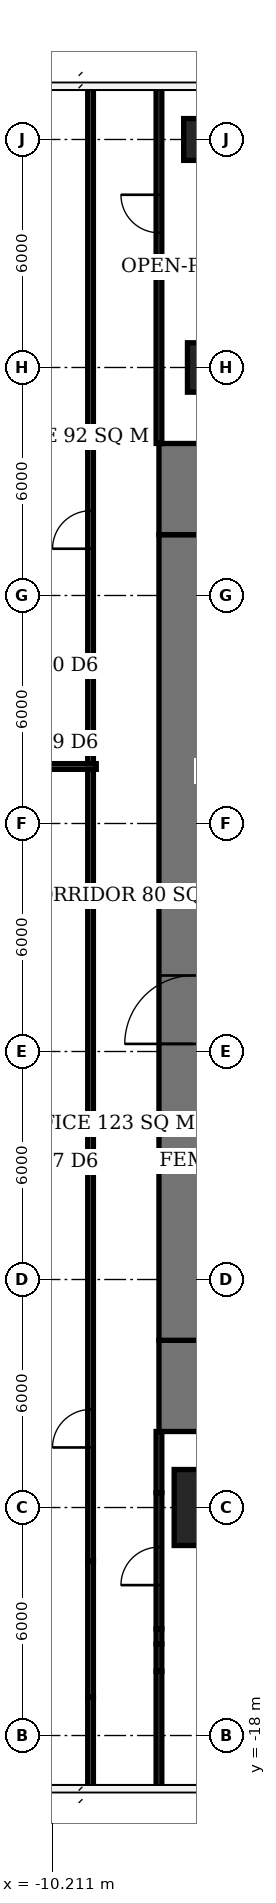
"""IFC4 building model, lengths in metres.
Left out: names, types, materials, properties, quantities, classifications, styles, units other than length and angle.
Written with IfcOpenShell. Run it as: python <this file> out.ifc"""

import sys

from ifc_helpers import new_model, si_unit, direction, frame, frame_2d, origin, origin_2d, place, context, subcontext, project, spatial, rectangle, extrude, element, fill, save


model = new_model("IFC4")
c1 = context("Model", 3, precision=1e-05, world=origin(), true_north=direction((0.0, 1.0)))
c2 = subcontext(c1, "Body", "Model", "MODEL_VIEW")
j1 = project(units=[si_unit("LENGTHUNIT", "METRE"), si_unit("PLANEANGLEUNIT", "RADIAN")], contexts=[c1])
p1 = place(None, origin())
s1 = spatial("IfcSite", under=j1, at=p1, CompositionType="ELEMENT")
p2 = place(p1, origin())
s2 = spatial("IfcBuilding", under=s1, at=p2, CompositionType="ELEMENT")
p3 = place(p2, frame((0.0, 0.0, 220.1)))
s3 = spatial("IfcBuildingStorey", under=s2, at=p3, CompositionType="ELEMENT", Elevation=220.1)
p4 = place(p3, frame((-6.0, -12.0, 0.0), z_axis=(0.0, 0.0, 1.0), x_axis=(1.0, 0.0, 0.0)))
e1 = element("IfcColumn", 1, at=p4, inside=s3, PredefinedType="COLUMN", context=c2, shape_type="SweptSolid", body=[
    extrude(rectangle(XDim=2.0, YDim=2.0, at=origin_2d()), origin(), (0.0, 0.0, 1.0), 3.9),
])
p5 = place(p3, frame((-6.0, 18.0, 0.0), z_axis=(0.0, 0.0, 1.0), x_axis=(1.0, 0.0, 0.0)))
e2 = element("IfcColumn", 2, at=p5, inside=s3, PredefinedType="COLUMN", context=c2, shape_type="SweptSolid", body=[
    extrude(rectangle(XDim=1.3, YDim=1.3, at=origin_2d()), origin(), (0.0, 0.0, 1.0), 3.9),
])
p6 = place(p3, frame((-6.0, 24.0, 0.0), z_axis=(0.0, 0.0, 1.0), x_axis=(1.0, 0.0, 0.0)))
e3 = element("IfcColumn", 3, at=p6, inside=s3, PredefinedType="COLUMN", context=c2, shape_type="SweptSolid", body=[
    extrude(rectangle(XDim=1.5, YDim=1.1, at=origin_2d()), origin(), (0.0, 0.0, 1.0), 3.9),
])
p7 = place(p3, frame((-6.5, -7.6, 0.0), z_axis=(0.0, 0.0, 1.0), x_axis=(0.0, 1.0, 0.0)))
e4 = element("IfcWall", 4, at=p7, inside=s3, PredefinedType="SHEAR", context=c2, shape_type="SweptSolid", body=[
    extrude(rectangle(XDim=21.2, YDim=1.8, at=frame_2d((10.6, 0.0))), origin(), (0.0, 0.0, 1.0), 3.9),
])
p8 = place(p7, frame((7.8, 0.0, 0.0)))
e5 = element("IfcOpeningElement", 5, at=p8, cuts=e4, PredefinedType="OPENING", context=c2, shape_type="SweptSolid", body=[
    extrude(rectangle(XDim=1.8, YDim=2.4, at=frame_2d((0.9, 1.2))), frame((0.0, 0.91, 0.0), z_axis=(0.0, -1.0, 0.0), x_axis=(1.0, 0.0, 0.0)), (0.0, 0.0, 1.0), 1.82),
])
for number, where, z_axis, x_axis in (
    (6, (-6.5, -10.0, 0.0), (0.0, 0.0, 1.0), (0.0, 1.0, 0.0)),
    (7, (-6.5, 13.6, 0.0), (0.0, 0.0, 1.0), (0.0, 1.0, 0.0)),
):
    element("IfcWall", number, at=place(p3, frame(where, z_axis=z_axis, x_axis=x_axis)), inside=s3, PredefinedType="SHEAR", context=c2, shape_type="SweptSolid", body=[
        extrude(rectangle(XDim=2.4, YDim=1.8, at=frame_2d((1.2, 0.0))), origin(), (0.0, 0.0, 1.0), 3.9),
    ])
p9 = place(p3, frame((-11.925, 7.5, 0.0), z_axis=(0.0, 0.0, 1.0), x_axis=(1.0, 0.0, 0.0)))
e8 = element("IfcWall", 8, at=p9, inside=s3, PredefinedType="PARTITIONING", context=c2, shape_type="SweptSolid", body=[
    extrude(rectangle(XDim=2.875, YDim=0.15, at=frame_2d((1.438, 0.0))), origin(), (0.0, 0.0, 1.0), 3.65),
])
p10 = place(p3, frame((-9.2, -19.4, 0.0), z_axis=(0.0, 0.0, 1.0), x_axis=(0.0, 1.0, 0.0)))
e9 = element("IfcWall", 9, at=p10, inside=s3, PredefinedType="PARTITIONING", context=c2, shape_type="SweptSolid", body=[
    extrude(rectangle(XDim=2.408, YDim=0.15, at=frame_2d((1.204, 0.0))), origin(), (0.0, 0.0, 1.0), 3.65),
])
p11 = place(p3, frame((-9.2, -16.992, 0.0), z_axis=(0.0, 0.0, 1.0), x_axis=(0.0, 1.0, 0.0)))
e10 = element("IfcWall", 10, at=p11, inside=s3, PredefinedType="PARTITIONING", context=c2, shape_type="SweptSolid", body=[
    extrude(rectangle(XDim=3.584, YDim=0.15, at=frame_2d((1.792, 0.0))), origin(), (0.0, 0.0, 1.0), 2.65),
])
p12 = place(p3, frame((-9.2, -13.408, 0.0), z_axis=(0.0, 0.0, 1.0), x_axis=(0.0, 1.0, 0.0)))
e11 = element("IfcWall", 11, at=p12, inside=s3, PredefinedType="PARTITIONING", context=c2, shape_type="SweptSolid", body=[
    extrude(rectangle(XDim=20.833, YDim=0.15, at=frame_2d((10.417, 0.0))), origin(), (0.0, 0.0, 1.0), 3.65),
])
p13 = place(p12, frame((2.988, 0.0, 0.0)))
e12 = element("IfcOpeningElement", 12, at=p13, cuts=e11, PredefinedType="OPENING", context=c2, shape_type="SweptSolid", body=[
    extrude(rectangle(XDim=1.0, YDim=2.1, at=frame_2d((0.5, 1.05))), frame((0.0, 0.085, 0.0), z_axis=(0.0, -1.0, 0.0), x_axis=(1.0, 0.0, 0.0)), (0.0, 0.0, 1.0), 0.17),
])
p14 = place(p3, frame((-9.2, 7.575, 0.0), z_axis=(0.0, 0.0, 1.0), x_axis=(0.0, 1.0, 0.0)))
e13 = element("IfcWall", 13, at=p14, inside=s3, PredefinedType="PARTITIONING", context=c2, shape_type="SweptSolid", body=[
    extrude(rectangle(XDim=17.825, YDim=0.15, at=frame_2d((8.913, 0.0))), origin(), (0.0, 0.0, 1.0), 3.65),
])
p15 = place(p14, frame((5.655, 0.0, 0.0)))
e14 = element("IfcOpeningElement", 14, at=p15, cuts=e13, PredefinedType="OPENING", context=c2, shape_type="SweptSolid", body=[
    extrude(rectangle(XDim=1.0, YDim=2.1, at=frame_2d((0.5, 1.05))), frame((0.0, 0.085, 0.0), z_axis=(0.0, -1.0, 0.0), x_axis=(1.0, 0.0, 0.0)), (0.0, 0.0, 1.0), 0.17),
])
p16 = place(p3, frame((-7.4, -19.4, 0.0), z_axis=(0.0, 0.0, 1.0), x_axis=(0.0, 1.0, 0.0)))
e15 = element("IfcWall", 15, at=p16, inside=s3, PredefinedType="PARTITIONING", context=c2, shape_type="SweptSolid", body=[
    extrude(rectangle(XDim=3.09, YDim=0.15, at=frame_2d((1.545, 0.0))), origin(), (0.0, 0.0, 1.0), 3.65),
])
p17 = place(p3, frame((-7.4, -16.31, 0.0), z_axis=(0.0, 0.0, 1.0), x_axis=(0.0, 1.0, 0.0)))
e16 = element("IfcWall", 16, at=p17, inside=s3, PredefinedType="PARTITIONING", context=c2, shape_type="SweptSolid", body=[
    extrude(rectangle(XDim=0.72, YDim=0.15, at=frame_2d((0.36, 0.0))), origin(), (0.0, 0.0, 1.0), 2.65),
])
p18 = place(p3, frame((-7.4, -15.59, 0.0), z_axis=(0.0, 0.0, 1.0), x_axis=(0.0, 1.0, 0.0)))
e17 = element("IfcWall", 17, at=p18, inside=s3, PredefinedType="PARTITIONING", context=c2, shape_type="SweptSolid", body=[
    extrude(rectangle(XDim=0.398, YDim=0.15, at=frame_2d((0.199, 0.0))), origin(), (0.0, 0.0, 1.0), 3.65),
])
p19 = place(p3, frame((-7.4, -15.192, 0.0), z_axis=(0.0, 0.0, 1.0), x_axis=(0.0, 1.0, 0.0)))
e18 = element("IfcWall", 18, at=p19, inside=s3, PredefinedType="PARTITIONING", context=c2, shape_type="SweptSolid", body=[
    extrude(rectangle(XDim=3.584, YDim=0.15, at=frame_2d((1.792, 0.0))), origin(), (0.0, 0.0, 1.0), 2.65),
])
p20 = place(p19, frame((1.15, 0.0, 0.0)))
e19 = element("IfcOpeningElement", 19, at=p20, cuts=e18, PredefinedType="OPENING", context=c2, shape_type="SweptSolid", body=[
    extrude(rectangle(XDim=1.0, YDim=2.1, at=frame_2d((0.5, 1.05))), frame((0.0, 0.085, 0.0), z_axis=(0.0, -1.0, 0.0), x_axis=(1.0, 0.0, 0.0)), (0.0, 0.0, 1.0), 0.17),
])
p21 = place(p3, frame((-7.4, -11.608, 0.0), z_axis=(0.0, 0.0, 1.0), x_axis=(0.0, 1.0, 0.0)))
e20 = element("IfcWall", 20, at=p21, inside=s3, PredefinedType="PARTITIONING", context=c2, shape_type="SweptSolid", body=[
    extrude(rectangle(XDim=1.608, YDim=0.15, at=frame_2d((0.804, 0.0))), origin(), (0.0, 0.0, 1.0), 3.65),
])
p22 = place(p3, frame((-7.4, 16.0, 0.0), z_axis=(0.0, 0.0, 1.0), x_axis=(0.0, 1.0, 0.0)))
e21 = element("IfcWall", 21, at=p22, inside=s3, PredefinedType="PARTITIONING", context=c2, shape_type="SweptSolid", body=[
    extrude(rectangle(XDim=9.4, YDim=0.15, at=frame_2d((4.7, 0.0))), origin(), (0.0, 0.0, 1.0), 3.65),
])
p23 = place(p22, frame((5.545, 0.0, 0.0)))
e22 = element("IfcOpeningElement", 22, at=p23, cuts=e21, PredefinedType="OPENING", context=c2, shape_type="SweptSolid", body=[
    extrude(rectangle(XDim=1.0, YDim=2.1, at=frame_2d((0.5, 1.05))), frame((0.0, 0.085, 0.0), z_axis=(0.0, -1.0, 0.0), x_axis=(1.0, 0.0, 0.0)), (0.0, 0.0, 1.0), 0.17),
])
p24 = place(p8, origin())
e23 = element("IfcDoor", 23, at=p24, inside=s3, OperationType="DOUBLE_DOOR_SINGLE_SWING", PredefinedType="DOOR", context=c2, shape_type="SweptSolid", body=[
    extrude(rectangle(XDim=1.8, YDim=2.4, at=frame_2d((0.9, 1.2))), frame((0.0, 0.025, 0.0), z_axis=(0.0, -1.0, 0.0), x_axis=(1.0, 0.0, 0.0)), (0.0, 0.0, 1.0), 0.05),
])
fill(e5, e23)
p25 = place(p20, origin())
e24 = element("IfcDoor", 24, at=p25, inside=s3, OperationType="SINGLE_SWING_LEFT", PredefinedType="DOOR", context=c2, shape_type="SweptSolid", body=[
    extrude(rectangle(XDim=1.0, YDim=2.1, at=frame_2d((0.5, 1.05))), frame((0.0, 0.025, 0.0), z_axis=(0.0, -1.0, 0.0), x_axis=(1.0, 0.0, 0.0)), (0.0, 0.0, 1.0), 0.05),
])
fill(e19, e24)
p26 = place(p13, origin())
e25 = element("IfcDoor", 25, at=p26, inside=s3, OperationType="SINGLE_SWING_LEFT", PredefinedType="DOOR", context=c2, shape_type="SweptSolid", body=[
    extrude(rectangle(XDim=1.0, YDim=2.1, at=frame_2d((0.5, 1.05))), frame((0.0, 0.025, 0.0), z_axis=(0.0, -1.0, 0.0), x_axis=(1.0, 0.0, 0.0)), (0.0, 0.0, 1.0), 0.05),
])
fill(e12, e25)
p27 = place(p15, origin())
e26 = element("IfcDoor", 26, at=p27, inside=s3, OperationType="SINGLE_SWING_LEFT", PredefinedType="DOOR", context=c2, shape_type="SweptSolid", body=[
    extrude(rectangle(XDim=1.0, YDim=2.1, at=frame_2d((0.5, 1.05))), frame((0.0, 0.025, 0.0), z_axis=(0.0, -1.0, 0.0), x_axis=(1.0, 0.0, 0.0)), (0.0, 0.0, 1.0), 0.05),
])
fill(e14, e26)
p28 = place(p23, origin())
e27 = element("IfcDoor", 27, at=p28, inside=s3, OperationType="SINGLE_SWING_RIGHT", PredefinedType="DOOR", context=c2, shape_type="SweptSolid", body=[
    extrude(rectangle(XDim=1.0, YDim=2.1, at=frame_2d((0.5, 1.05))), frame((0.0, 0.025, 0.0), z_axis=(0.0, -1.0, 0.0), x_axis=(1.0, 0.0, 0.0)), (0.0, 0.0, 1.0), 0.05),
])
fill(e22, e27)
save(model, sys.argv[1])
